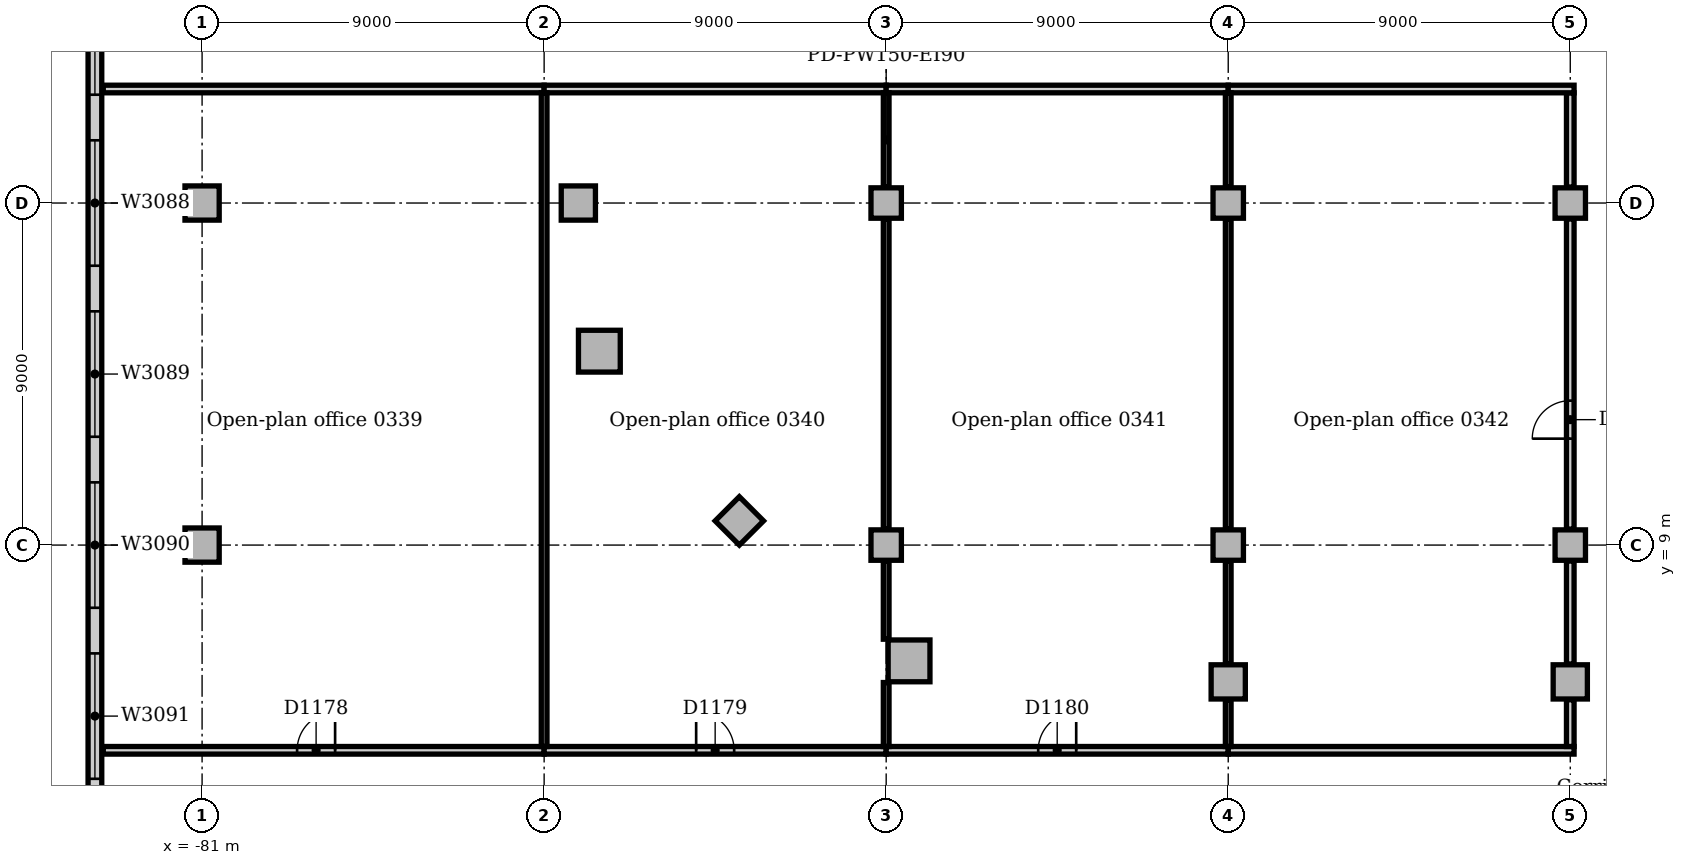
"""IFC4 building model, lengths in metres.
Left out: names, types, materials, properties, quantities, classifications, styles, units other than length and angle.
Written with IfcOpenShell. Run it as: python <this file> out.ifc"""

import sys

from ifc_helpers import new_model, si_unit, direction, frame, frame_2d, origin, origin_2d, place, context, subcontext, project, spatial, rectangle, extrude, element, fill, save


model = new_model("IFC4")
c1 = context("Model", 3, precision=1e-05, world=origin(), true_north=direction((0.0, 1.0)))
c2 = subcontext(c1, "Body", "Model", "MODEL_VIEW")
j1 = project(units=[si_unit("LENGTHUNIT", "METRE"), si_unit("PLANEANGLEUNIT", "RADIAN")], contexts=[c1])
p1 = place(None, origin())
s1 = spatial("IfcSite", under=j1, at=p1, CompositionType="ELEMENT")
p2 = place(p1, origin())
s2 = spatial("IfcBuilding", under=s1, at=p2, CompositionType="ELEMENT")
p3 = place(p2, frame((0.0, 0.0, 16.0)))
s3 = spatial("IfcBuildingStorey", under=s2, at=p3, CompositionType="ELEMENT", Elevation=16.0)
for number, where, z_axis, x_axis in (
    (1, (-62.398, 5.953, 0.0), (0.0, 0.0, 1.0), (1.0, 0.0, 0.0)),
    (2, (-70.547, 14.102, 0.0), (0.0, 0.0, 1.0), (1.0, 0.0, 0.0)),
):
    element("IfcColumn", number, at=place(p3, frame(where, z_axis=z_axis, x_axis=x_axis)), inside=s3, PredefinedType="COLUMN", context=c2, shape_type="SweptSolid", body=[
        extrude(rectangle(XDim=1.1, YDim=1.1, at=origin_2d()), origin(), (0.0, 0.0, 1.0), 4.7),
    ])
for number, where, z_axis, x_axis in (
    (3, (-54.0, 5.4, 0.0), (0.0, 0.0, 1.0), (1.0, 0.0, 0.0)),
    (4, (-45.0, 5.4, 0.0), (0.0, 0.0, 1.0), (1.0, 0.0, 0.0)),
    (5, (-71.1, 18.0, 0.0), (0.0, 0.0, 1.0), (1.0, 0.0, 0.0)),
    (6, (-66.864, 9.636, 0.0), (0.0, 0.0, 1.0), (0.707, 0.707, 0.0)),
):
    element("IfcColumn", number, at=place(p3, frame(where, z_axis=z_axis, x_axis=x_axis)), inside=s3, PredefinedType="COLUMN", context=c2, shape_type="SweptSolid", body=[
        extrude(rectangle(XDim=0.9, YDim=0.9, at=origin_2d()), origin(), (0.0, 0.0, 1.0), 4.7),
    ])
for number, where, z_axis, x_axis in (
    (7, (-63.0, 9.0, 0.0), (0.0, 0.0, 1.0), (1.0, 0.0, 0.0)),
    (8, (-63.0, 18.0, 0.0), (0.0, 0.0, 1.0), (1.0, 0.0, 0.0)),
    (9, (-54.0, 9.0, 0.0), (0.0, 0.0, 1.0), (1.0, 0.0, 0.0)),
    (10, (-54.0, 18.0, 0.0), (0.0, 0.0, 1.0), (1.0, 0.0, 0.0)),
    (11, (-45.0, 9.0, 0.0), (0.0, 0.0, 1.0), (1.0, 0.0, 0.0)),
    (12, (-45.0, 18.0, 0.0), (0.0, 0.0, 1.0), (1.0, 0.0, 0.0)),
):
    element("IfcColumn", number, at=place(p3, frame(where, z_axis=z_axis, x_axis=x_axis)), inside=s3, PredefinedType="COLUMN", context=c2, shape_type="SweptSolid", body=[
        extrude(rectangle(XDim=0.8, YDim=0.8, at=origin_2d()), origin(), (0.0, 0.0, 1.0), 4.7),
    ])
for number, where, z_axis, x_axis in (
    (13, (-81.0, 9.0, 0.0), (0.0, 0.0, 1.0), (1.0, 0.0, 0.0)),
    (14, (-81.0, 18.0, 0.0), (0.0, 0.0, 1.0), (1.0, 0.0, 0.0)),
):
    element("IfcColumn", number, at=place(p3, frame(where, z_axis=z_axis, x_axis=x_axis)), inside=s3, PredefinedType="COLUMN", context=c2, shape_type="SweptSolid", body=[
        extrude(rectangle(XDim=0.9, YDim=0.9, at=origin_2d()), origin(), (0.0, 0.0, 1.0), 4.7),
    ])
p4 = place(p3, frame((-83.82, 54.0, 0.0), z_axis=(0.0, 0.0, 1.0), x_axis=(0.0, -1.0, 0.0)))
e15 = element("IfcWall", 15, at=p4, inside=s3, PredefinedType="STANDARD", context=c2, shape_type="SweptSolid", body=[
    extrude(rectangle(XDim=63.0, YDim=0.36, at=frame_2d((31.5, 0.0))), origin(), (0.0, 0.0, 1.0), 4.7),
])
p5 = place(p4, frame((2.85, 0.0, 0.9)))
e16 = element("IfcOpeningElement", 16, at=p5, cuts=e15, PredefinedType="OPENING", context=c2, shape_type="SweptSolid", body=[
    extrude(rectangle(XDim=3.3, YDim=2.4, at=frame_2d((1.65, 1.2))), frame((0.0, 0.19, 0.0), z_axis=(0.0, -1.0, 0.0), x_axis=(1.0, 0.0, 0.0)), (0.0, 0.0, 1.0), 0.38),
])
p6 = place(p4, frame((7.35, 0.0, 0.9)))
e17 = element("IfcOpeningElement", 17, at=p6, cuts=e15, PredefinedType="OPENING", context=c2, shape_type="SweptSolid", body=[
    extrude(rectangle(XDim=3.3, YDim=2.4, at=frame_2d((1.65, 1.2))), frame((0.0, 0.19, 0.0), z_axis=(0.0, -1.0, 0.0), x_axis=(1.0, 0.0, 0.0)), (0.0, 0.0, 1.0), 0.38),
])
p7 = place(p4, frame((11.85, 0.0, 0.9)))
e18 = element("IfcOpeningElement", 18, at=p7, cuts=e15, PredefinedType="OPENING", context=c2, shape_type="SweptSolid", body=[
    extrude(rectangle(XDim=3.3, YDim=2.4, at=frame_2d((1.65, 1.2))), frame((0.0, 0.19, 0.0), z_axis=(0.0, -1.0, 0.0), x_axis=(1.0, 0.0, 0.0)), (0.0, 0.0, 1.0), 0.38),
])
p8 = place(p4, frame((16.35, 0.0, 0.9)))
e19 = element("IfcOpeningElement", 19, at=p8, cuts=e15, PredefinedType="OPENING", context=c2, shape_type="SweptSolid", body=[
    extrude(rectangle(XDim=3.3, YDim=2.4, at=frame_2d((1.65, 1.2))), frame((0.0, 0.19, 0.0), z_axis=(0.0, -1.0, 0.0), x_axis=(1.0, 0.0, 0.0)), (0.0, 0.0, 1.0), 0.38),
])
p9 = place(p4, frame((20.85, 0.0, 0.9)))
e20 = element("IfcOpeningElement", 20, at=p9, cuts=e15, PredefinedType="OPENING", context=c2, shape_type="SweptSolid", body=[
    extrude(rectangle(XDim=3.3, YDim=2.4, at=frame_2d((1.65, 1.2))), frame((0.0, 0.19, 0.0), z_axis=(0.0, -1.0, 0.0), x_axis=(1.0, 0.0, 0.0)), (0.0, 0.0, 1.0), 0.38),
])
p10 = place(p4, frame((25.35, 0.0, 0.9)))
e21 = element("IfcOpeningElement", 21, at=p10, cuts=e15, PredefinedType="OPENING", context=c2, shape_type="SweptSolid", body=[
    extrude(rectangle(XDim=3.3, YDim=2.4, at=frame_2d((1.65, 1.2))), frame((0.0, 0.19, 0.0), z_axis=(0.0, -1.0, 0.0), x_axis=(1.0, 0.0, 0.0)), (0.0, 0.0, 1.0), 0.38),
])
p11 = place(p4, frame((29.85, 0.0, 0.9)))
e22 = element("IfcOpeningElement", 22, at=p11, cuts=e15, PredefinedType="OPENING", context=c2, shape_type="SweptSolid", body=[
    extrude(rectangle(XDim=3.3, YDim=2.4, at=frame_2d((1.65, 1.2))), frame((0.0, 0.19, 0.0), z_axis=(0.0, -1.0, 0.0), x_axis=(1.0, 0.0, 0.0)), (0.0, 0.0, 1.0), 0.38),
])
p12 = place(p4, frame((34.35, 0.0, 0.9)))
e23 = element("IfcOpeningElement", 23, at=p12, cuts=e15, PredefinedType="OPENING", context=c2, shape_type="SweptSolid", body=[
    extrude(rectangle(XDim=3.3, YDim=2.4, at=frame_2d((1.65, 1.2))), frame((0.0, 0.19, 0.0), z_axis=(0.0, -1.0, 0.0), x_axis=(1.0, 0.0, 0.0)), (0.0, 0.0, 1.0), 0.38),
])
p13 = place(p4, frame((38.85, 0.0, 0.9)))
e24 = element("IfcOpeningElement", 24, at=p13, cuts=e15, PredefinedType="OPENING", context=c2, shape_type="SweptSolid", body=[
    extrude(rectangle(XDim=3.3, YDim=2.4, at=frame_2d((1.65, 1.2))), frame((0.0, 0.19, 0.0), z_axis=(0.0, -1.0, 0.0), x_axis=(1.0, 0.0, 0.0)), (0.0, 0.0, 1.0), 0.38),
])
p14 = place(p4, frame((43.35, 0.0, 0.9)))
e25 = element("IfcOpeningElement", 25, at=p14, cuts=e15, PredefinedType="OPENING", context=c2, shape_type="SweptSolid", body=[
    extrude(rectangle(XDim=3.3, YDim=2.4, at=frame_2d((1.65, 1.2))), frame((0.0, 0.19, 0.0), z_axis=(0.0, -1.0, 0.0), x_axis=(1.0, 0.0, 0.0)), (0.0, 0.0, 1.0), 0.38),
])
p15 = place(p4, frame((47.85, 0.0, 0.9)))
e26 = element("IfcOpeningElement", 26, at=p15, cuts=e15, PredefinedType="OPENING", context=c2, shape_type="SweptSolid", body=[
    extrude(rectangle(XDim=3.3, YDim=2.4, at=frame_2d((1.65, 1.2))), frame((0.0, 0.19, 0.0), z_axis=(0.0, -1.0, 0.0), x_axis=(1.0, 0.0, 0.0)), (0.0, 0.0, 1.0), 0.38),
])
p16 = place(p4, frame((52.35, 0.0, 0.9)))
e27 = element("IfcOpeningElement", 27, at=p16, cuts=e15, PredefinedType="OPENING", context=c2, shape_type="SweptSolid", body=[
    extrude(rectangle(XDim=3.3, YDim=2.4, at=frame_2d((1.65, 1.2))), frame((0.0, 0.19, 0.0), z_axis=(0.0, -1.0, 0.0), x_axis=(1.0, 0.0, 0.0)), (0.0, 0.0, 1.0), 0.38),
])
p17 = place(p4, frame((56.85, 0.0, 0.9)))
e28 = element("IfcOpeningElement", 28, at=p17, cuts=e15, PredefinedType="OPENING", context=c2, shape_type="SweptSolid", body=[
    extrude(rectangle(XDim=3.3, YDim=2.4, at=frame_2d((1.65, 1.2))), frame((0.0, 0.19, 0.0), z_axis=(0.0, -1.0, 0.0), x_axis=(1.0, 0.0, 0.0)), (0.0, 0.0, 1.0), 0.38),
])
p18 = place(p3, frame((-83.6, 3.6, 0.0), z_axis=(0.0, 0.0, 1.0), x_axis=(1.0, 0.0, 0.0)))
e29 = element("IfcWall", 29, at=p18, inside=s3, PredefinedType="PARTITIONING", context=c2, shape_type="SweptSolid", body=[
    extrude(rectangle(XDim=11.6, YDim=0.2, at=frame_2d((5.8, 0.0))), origin(), (0.0, 0.0, 1.0), 4.7),
])
p19 = place(p18, frame((5.1, 0.0, 0.0)))
e30 = element("IfcOpeningElement", 30, at=p19, cuts=e29, PredefinedType="OPENING", context=c2, shape_type="SweptSolid", body=[
    extrude(rectangle(XDim=1.0, YDim=2.1, at=frame_2d((0.5, 1.05))), frame((0.0, 0.11, 0.0), z_axis=(0.0, -1.0, 0.0), x_axis=(1.0, 0.0, 0.0)), (0.0, 0.0, 1.0), 0.22),
])
p20 = place(p3, frame((-72.0, 3.6, 0.0), z_axis=(0.0, 0.0, 1.0), x_axis=(1.0, 0.0, 0.0)))
e31 = element("IfcWall", 31, at=p20, inside=s3, PredefinedType="PARTITIONING", context=c2, shape_type="SweptSolid", body=[
    extrude(rectangle(XDim=9.0, YDim=0.2, at=frame_2d((4.5, 0.0))), origin(), (0.0, 0.0, 1.0), 4.7),
])
p21 = place(p20, frame((4.0, 0.0, 0.0)))
e32 = element("IfcOpeningElement", 32, at=p21, cuts=e31, PredefinedType="OPENING", context=c2, shape_type="SweptSolid", body=[
    extrude(rectangle(XDim=1.0, YDim=2.1, at=frame_2d((0.5, 1.05))), frame((0.0, 0.11, 0.0), z_axis=(0.0, -1.0, 0.0), x_axis=(1.0, 0.0, 0.0)), (0.0, 0.0, 1.0), 0.22),
])
p22 = place(p3, frame((-63.0, 3.6, 0.0), z_axis=(0.0, 0.0, 1.0), x_axis=(1.0, 0.0, 0.0)))
e33 = element("IfcWall", 33, at=p22, inside=s3, PredefinedType="PARTITIONING", context=c2, shape_type="SweptSolid", body=[
    extrude(rectangle(XDim=9.0, YDim=0.2, at=frame_2d((4.5, 0.0))), origin(), (0.0, 0.0, 1.0), 4.7),
])
p23 = place(p22, frame((4.0, 0.0, 0.0)))
e34 = element("IfcOpeningElement", 34, at=p23, cuts=e33, PredefinedType="OPENING", context=c2, shape_type="SweptSolid", body=[
    extrude(rectangle(XDim=1.0, YDim=2.1, at=frame_2d((0.5, 1.05))), frame((0.0, 0.11, 0.0), z_axis=(0.0, -1.0, 0.0), x_axis=(1.0, 0.0, 0.0)), (0.0, 0.0, 1.0), 0.22),
])
p24 = place(p3, frame((-54.0, 3.6, 0.0), z_axis=(0.0, 0.0, 1.0), x_axis=(1.0, 0.0, 0.0)))
e35 = element("IfcWall", 35, at=p24, inside=s3, PredefinedType="PARTITIONING", context=c2, shape_type="SweptSolid", body=[
    extrude(rectangle(XDim=9.1, YDim=0.2, at=frame_2d((4.55, 0.0))), origin(), (0.0, 0.0, 1.0), 4.7),
])
p25 = place(p3, frame((-45.0, 3.7, 0.0), z_axis=(0.0, 0.0, 1.0), x_axis=(0.0, 1.0, 0.0)))
e36 = element("IfcWall", 36, at=p25, inside=s3, PredefinedType="PARTITIONING", context=c2, shape_type="SweptSolid", body=[
    extrude(rectangle(XDim=1.23, YDim=0.2, at=frame_2d((0.615, 0.0))), origin(), (0.0, 0.0, 1.0), 4.7),
])
p26 = place(p3, frame((-45.0, 5.87, 0.0), z_axis=(0.0, 0.0, 1.0), x_axis=(0.0, 1.0, 0.0)))
e37 = element("IfcWall", 37, at=p26, inside=s3, PredefinedType="PARTITIONING", context=c2, shape_type="SweptSolid", body=[
    extrude(rectangle(XDim=2.71, YDim=0.2, at=frame_2d((1.355, 0.0))), origin(), (0.0, 0.0, 1.0), 4.7),
])
p27 = place(p3, frame((-45.0, 9.42, 0.0), z_axis=(0.0, 0.0, 1.0), x_axis=(0.0, 1.0, 0.0)))
e38 = element("IfcWall", 38, at=p27, inside=s3, PredefinedType="PARTITIONING", context=c2, shape_type="SweptSolid", body=[
    extrude(rectangle(XDim=8.16, YDim=0.2, at=frame_2d((4.08, 0.0))), origin(), (0.0, 0.0, 1.0), 4.7),
])
p28 = place(p27, frame((2.38, 0.0, 0.0)))
e39 = element("IfcOpeningElement", 39, at=p28, cuts=e38, PredefinedType="OPENING", context=c2, shape_type="SweptSolid", body=[
    extrude(rectangle(XDim=1.0, YDim=2.1, at=frame_2d((0.5, 1.05))), frame((0.0, 0.11, 0.0), z_axis=(0.0, -1.0, 0.0), x_axis=(1.0, 0.0, 0.0)), (0.0, 0.0, 1.0), 0.22),
])
p29 = place(p3, frame((-45.0, 18.42, 0.0), z_axis=(0.0, 0.0, 1.0), x_axis=(0.0, 1.0, 0.0)))
e40 = element("IfcWall", 40, at=p29, inside=s3, PredefinedType="PARTITIONING", context=c2, shape_type="SweptSolid", body=[
    extrude(rectangle(XDim=2.48, YDim=0.2, at=frame_2d((1.24, 0.0))), origin(), (0.0, 0.0, 1.0), 4.7),
])
p30 = place(p3, frame((-83.6, 21.0, 0.0), z_axis=(0.0, 0.0, 1.0), x_axis=(1.0, 0.0, 0.0)))
e41 = element("IfcWall", 41, at=p30, inside=s3, PredefinedType="PARTITIONING", context=c2, shape_type="SweptSolid", body=[
    extrude(rectangle(XDim=11.6, YDim=0.2, at=frame_2d((5.8, 0.0))), origin(), (0.0, 0.0, 1.0), 4.7),
])
for number, where, z_axis, x_axis in (
    (42, (-72.0, 21.0, 0.0), (0.0, 0.0, 1.0), (1.0, 0.0, 0.0)),
    (43, (-63.0, 21.0, 0.0), (0.0, 0.0, 1.0), (1.0, 0.0, 0.0)),
):
    element("IfcWall", number, at=place(p3, frame(where, z_axis=z_axis, x_axis=x_axis)), inside=s3, PredefinedType="PARTITIONING", context=c2, shape_type="SweptSolid", body=[
        extrude(rectangle(XDim=9.0, YDim=0.2, at=frame_2d((4.5, 0.0))), origin(), (0.0, 0.0, 1.0), 4.7),
    ])
p31 = place(p3, frame((-54.0, 21.0, 0.0), z_axis=(0.0, 0.0, 1.0), x_axis=(1.0, 0.0, 0.0)))
e44 = element("IfcWall", 44, at=p31, inside=s3, PredefinedType="PARTITIONING", context=c2, shape_type="SweptSolid", body=[
    extrude(rectangle(XDim=9.1, YDim=0.2, at=frame_2d((4.55, 0.0))), origin(), (0.0, 0.0, 1.0), 4.7),
])
p32 = place(p3, frame((-72.0, 3.7, 0.0), z_axis=(0.0, 0.0, 1.0), x_axis=(0.0, 1.0, 0.0)))
e45 = element("IfcWall", 45, at=p32, inside=s3, PredefinedType="PARTITIONING", context=c2, shape_type="SweptSolid", body=[
    extrude(rectangle(XDim=17.2, YDim=0.15, at=frame_2d((8.6, 0.0))), origin(), (0.0, 0.0, 1.0), 4.7),
])
p33 = place(p3, frame((-63.0, 3.7, 0.0), z_axis=(0.0, 0.0, 1.0), x_axis=(0.0, 1.0, 0.0)))
e46 = element("IfcWall", 46, at=p33, inside=s3, PredefinedType="PARTITIONING", context=c2, shape_type="SweptSolid", body=[
    extrude(rectangle(XDim=1.683, YDim=0.15, at=frame_2d((0.842, 0.0))), origin(), (0.0, 0.0, 1.0), 4.7),
])
p34 = place(p3, frame((-63.0, 6.523, 0.0), z_axis=(0.0, 0.0, 1.0), x_axis=(0.0, 1.0, 0.0)))
e47 = element("IfcWall", 47, at=p34, inside=s3, PredefinedType="PARTITIONING", context=c2, shape_type="SweptSolid", body=[
    extrude(rectangle(XDim=2.057, YDim=0.15, at=frame_2d((1.028, 0.0))), origin(), (0.0, 0.0, 1.0), 4.7),
])
p35 = place(p3, frame((-63.0, 9.42, 0.0), z_axis=(0.0, 0.0, 1.0), x_axis=(0.0, 1.0, 0.0)))
e48 = element("IfcWall", 48, at=p35, inside=s3, PredefinedType="PARTITIONING", context=c2, shape_type="SweptSolid", body=[
    extrude(rectangle(XDim=8.16, YDim=0.15, at=frame_2d((4.08, 0.0))), origin(), (0.0, 0.0, 1.0), 4.7),
])
p36 = place(p3, frame((-63.0, 18.42, 0.0), z_axis=(0.0, 0.0, 1.0), x_axis=(0.0, 1.0, 0.0)))
e49 = element("IfcWall", 49, at=p36, inside=s3, PredefinedType="PARTITIONING", context=c2, shape_type="SweptSolid", body=[
    extrude(rectangle(XDim=2.48, YDim=0.15, at=frame_2d((1.24, 0.0))), origin(), (0.0, 0.0, 1.0), 4.7),
])
p37 = place(p3, frame((-54.0, 3.7, 0.0), z_axis=(0.0, 0.0, 1.0), x_axis=(0.0, 1.0, 0.0)))
e50 = element("IfcWall", 50, at=p37, inside=s3, PredefinedType="PARTITIONING", context=c2, shape_type="SweptSolid", body=[
    extrude(rectangle(XDim=1.23, YDim=0.15, at=frame_2d((0.615, 0.0))), origin(), (0.0, 0.0, 1.0), 4.7),
])
p38 = place(p3, frame((-54.0, 5.87, 0.0), z_axis=(0.0, 0.0, 1.0), x_axis=(0.0, 1.0, 0.0)))
e51 = element("IfcWall", 51, at=p38, inside=s3, PredefinedType="PARTITIONING", context=c2, shape_type="SweptSolid", body=[
    extrude(rectangle(XDim=2.71, YDim=0.15, at=frame_2d((1.355, 0.0))), origin(), (0.0, 0.0, 1.0), 4.7),
])
p39 = place(p3, frame((-54.0, 9.42, 0.0), z_axis=(0.0, 0.0, 1.0), x_axis=(0.0, 1.0, 0.0)))
e52 = element("IfcWall", 52, at=p39, inside=s3, PredefinedType="PARTITIONING", context=c2, shape_type="SweptSolid", body=[
    extrude(rectangle(XDim=8.16, YDim=0.15, at=frame_2d((4.08, 0.0))), origin(), (0.0, 0.0, 1.0), 4.7),
])
p40 = place(p3, frame((-54.0, 18.42, 0.0), z_axis=(0.0, 0.0, 1.0), x_axis=(0.0, 1.0, 0.0)))
e53 = element("IfcWall", 53, at=p40, inside=s3, PredefinedType="PARTITIONING", context=c2, shape_type="SweptSolid", body=[
    extrude(rectangle(XDim=2.48, YDim=0.15, at=frame_2d((1.24, 0.0))), origin(), (0.0, 0.0, 1.0), 4.7),
])
p41 = place(p11, origin())
e54 = element("IfcWindow", 54, at=p41, inside=s3, PartitioningType="SINGLE_PANEL", PredefinedType="WINDOW", context=c2, shape_type="SweptSolid", body=[
    extrude(rectangle(XDim=3.3, YDim=2.4, at=frame_2d((1.65, 1.2))), frame((0.0, 0.13, 0.0), z_axis=(0.0, -1.0, 0.0), x_axis=(1.0, 0.0, 0.0)), (0.0, 0.0, 1.0), 0.06),
])
fill(e22, e54)
p42 = place(p12, origin())
e55 = element("IfcWindow", 55, at=p42, inside=s3, PartitioningType="SINGLE_PANEL", PredefinedType="WINDOW", context=c2, shape_type="SweptSolid", body=[
    extrude(rectangle(XDim=3.3, YDim=2.4, at=frame_2d((1.65, 1.2))), frame((0.0, 0.13, 0.0), z_axis=(0.0, -1.0, 0.0), x_axis=(1.0, 0.0, 0.0)), (0.0, 0.0, 1.0), 0.06),
])
fill(e23, e55)
p43 = place(p13, origin())
e56 = element("IfcWindow", 56, at=p43, inside=s3, PartitioningType="SINGLE_PANEL", PredefinedType="WINDOW", context=c2, shape_type="SweptSolid", body=[
    extrude(rectangle(XDim=3.3, YDim=2.4, at=frame_2d((1.65, 1.2))), frame((0.0, 0.13, 0.0), z_axis=(0.0, -1.0, 0.0), x_axis=(1.0, 0.0, 0.0)), (0.0, 0.0, 1.0), 0.06),
])
fill(e24, e56)
p44 = place(p14, origin())
e57 = element("IfcWindow", 57, at=p44, inside=s3, PartitioningType="SINGLE_PANEL", PredefinedType="WINDOW", context=c2, shape_type="SweptSolid", body=[
    extrude(rectangle(XDim=3.3, YDim=2.4, at=frame_2d((1.65, 1.2))), frame((0.0, 0.13, 0.0), z_axis=(0.0, -1.0, 0.0), x_axis=(1.0, 0.0, 0.0)), (0.0, 0.0, 1.0), 0.06),
])
fill(e25, e57)
p45 = place(p15, origin())
e58 = element("IfcWindow", 58, at=p45, inside=s3, PartitioningType="SINGLE_PANEL", PredefinedType="WINDOW", context=c2, shape_type="SweptSolid", body=[
    extrude(rectangle(XDim=3.3, YDim=2.4, at=frame_2d((1.65, 1.2))), frame((0.0, 0.13, 0.0), z_axis=(0.0, -1.0, 0.0), x_axis=(1.0, 0.0, 0.0)), (0.0, 0.0, 1.0), 0.06),
])
fill(e26, e58)
p46 = place(p19, origin())
e59 = element("IfcDoor", 59, at=p46, inside=s3, OperationType="SINGLE_SWING_RIGHT", PredefinedType="DOOR", context=c2, shape_type="SweptSolid", body=[
    extrude(rectangle(XDim=1.0, YDim=2.1, at=frame_2d((0.5, 1.05))), frame((0.0, 0.025, 0.0), z_axis=(0.0, -1.0, 0.0), x_axis=(1.0, 0.0, 0.0)), (0.0, 0.0, 1.0), 0.05),
])
fill(e30, e59)
p47 = place(p21, origin())
e60 = element("IfcDoor", 60, at=p47, inside=s3, OperationType="SINGLE_SWING_LEFT", PredefinedType="DOOR", context=c2, shape_type="SweptSolid", body=[
    extrude(rectangle(XDim=1.0, YDim=2.1, at=frame_2d((0.5, 1.05))), frame((0.0, 0.025, 0.0), z_axis=(0.0, -1.0, 0.0), x_axis=(1.0, 0.0, 0.0)), (0.0, 0.0, 1.0), 0.05),
])
fill(e32, e60)
p48 = place(p23, origin())
e61 = element("IfcDoor", 61, at=p48, inside=s3, OperationType="SINGLE_SWING_RIGHT", PredefinedType="DOOR", context=c2, shape_type="SweptSolid", body=[
    extrude(rectangle(XDim=1.0, YDim=2.1, at=frame_2d((0.5, 1.05))), frame((0.0, 0.025, 0.0), z_axis=(0.0, -1.0, 0.0), x_axis=(1.0, 0.0, 0.0)), (0.0, 0.0, 1.0), 0.05),
])
fill(e34, e61)
p49 = place(p28, origin())
e62 = element("IfcDoor", 62, at=p49, inside=s3, OperationType="SINGLE_SWING_LEFT", PredefinedType="DOOR", context=c2, shape_type="SweptSolid", body=[
    extrude(rectangle(XDim=1.0, YDim=2.1, at=frame_2d((0.5, 1.05))), frame((0.0, 0.025, 0.0), z_axis=(0.0, -1.0, 0.0), x_axis=(1.0, 0.0, 0.0)), (0.0, 0.0, 1.0), 0.05),
])
fill(e39, e62)
save(model, sys.argv[1])
